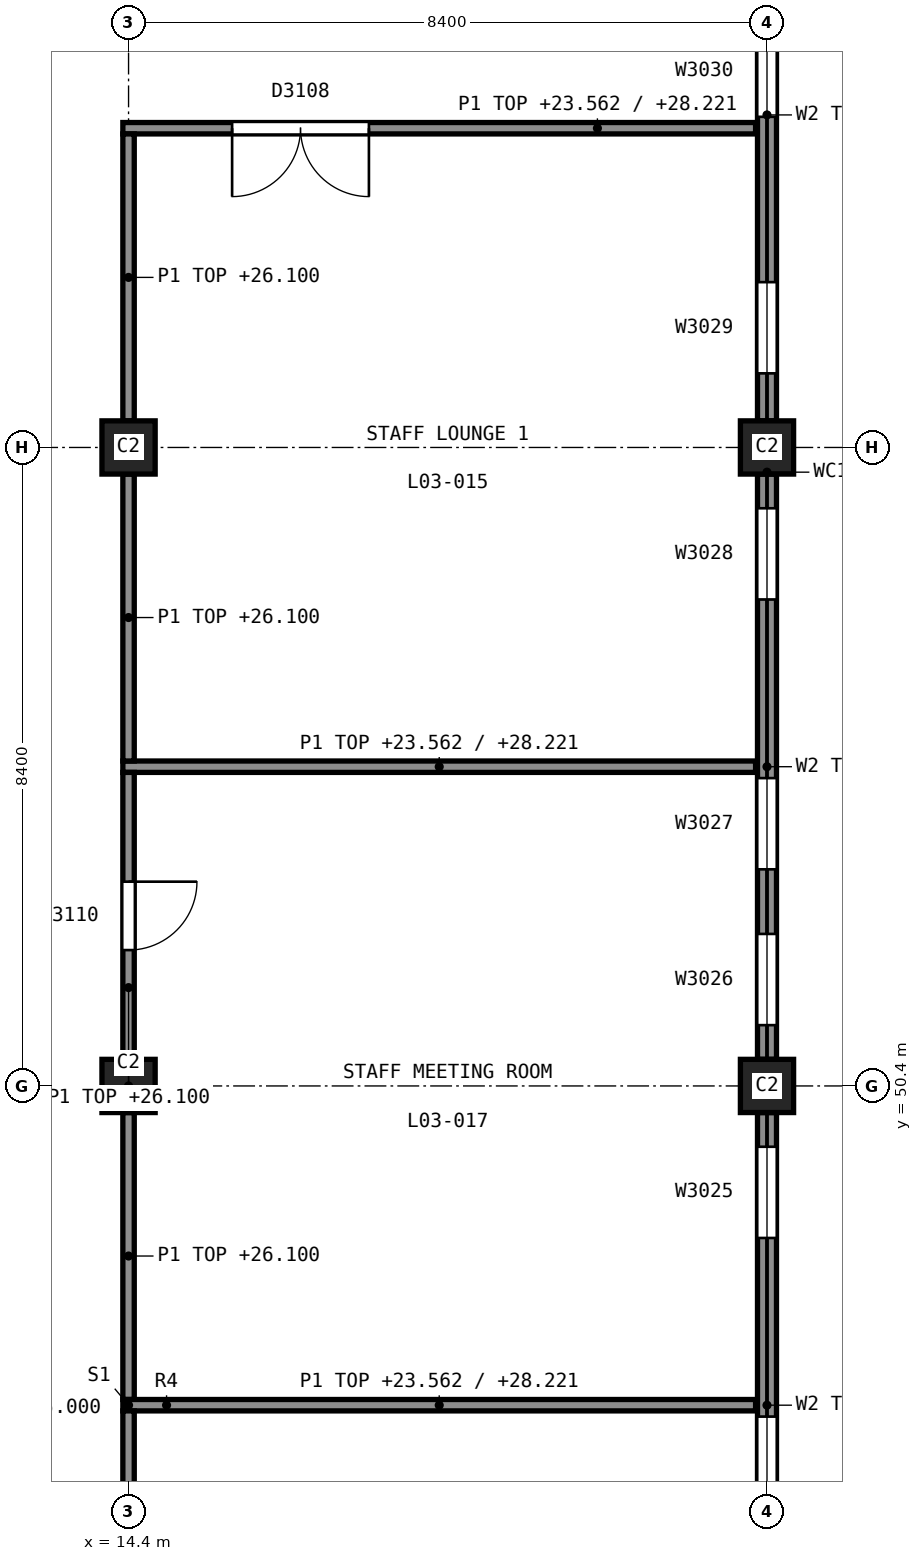
"""IFC4 building model, lengths in metres.
Left out: names, types, materials, properties, quantities, classifications, styles, units other than length and angle.
Written with IfcOpenShell. Run it as: python <this file> out.ifc"""

import sys

from ifc_helpers import new_model, si_unit, direction, frame, frame_2d, origin, origin_2d, place, context, subcontext, project, spatial, polyline, rectangle, outline, extrude, element, fill, save


model = new_model("IFC4")
c1 = context("Model", 3, precision=1e-05, world=origin(), true_north=direction((0.0, 1.0)))
c2 = subcontext(c1, "Body", "Model", "MODEL_VIEW")
j1 = project(units=[si_unit("LENGTHUNIT", "METRE"), si_unit("PLANEANGLEUNIT", "RADIAN")], contexts=[c1])
p1 = place(None, origin())
s1 = spatial("IfcSite", under=j1, at=p1, CompositionType="ELEMENT")
p2 = place(p1, origin())
s2 = spatial("IfcBuilding", under=s1, at=p2, CompositionType="ELEMENT")
p3 = place(p2, frame((0.0, 0.0, 20.0)))
s3 = spatial("IfcBuildingStorey", under=s2, at=p3, CompositionType="ELEMENT", Elevation=20.0)
for number, where, z_axis, x_axis in (
    (1, (14.4, 50.4, 0.0), (0.0, 0.0, 1.0), (1.0, 0.0, 0.0)),
    (2, (14.4, 58.8, 0.0), (0.0, 0.0, 1.0), (1.0, 0.0, 0.0)),
    (3, (22.8, 50.4, 0.0), (0.0, 0.0, 1.0), (1.0, 0.0, 0.0)),
    (4, (22.8, 58.8, 0.0), (0.0, 0.0, 1.0), (1.0, 0.0, 0.0)),
):
    element("IfcColumn", number, at=place(p3, frame(where, z_axis=z_axis, x_axis=x_axis)), inside=s3, PredefinedType="COLUMN", context=c2, shape_type="SweptSolid", body=[
        extrude(rectangle(XDim=0.7, YDim=0.7, at=origin_2d()), origin(), (0.0, 0.0, 1.0), 5.0),
    ])
p4 = place(p3, frame((22.8, 42.35, 0.0), z_axis=(0.0, 0.0, 1.0), x_axis=(0.0, 1.0, 0.0)))
e5 = element("IfcWall", 5, at=p4, inside=s3, PredefinedType="SOLIDWALL", context=c2, shape_type="SweptSolid", body=[
    extrude(rectangle(XDim=7.7, YDim=0.25, at=frame_2d((3.85, 0.0))), origin(), (0.0, 0.0, 1.0), 8.746),
])
p5 = place(p4, frame((0.45, 0.0, 0.9)))
e6 = element("IfcOpeningElement", 6, at=p5, cuts=e5, PredefinedType="OPENING", context=c2, shape_type="SweptSolid", body=[
    extrude(rectangle(XDim=1.2, YDim=2.1, at=frame_2d((0.6, 1.05))), frame((0.0, 0.135, 0.0), z_axis=(0.0, -1.0, 0.0), x_axis=(1.0, 0.0, 0.0)), (0.0, 0.0, 1.0), 0.27),
])
p6 = place(p4, frame((2.5, 0.0, 0.9)))
e7 = element("IfcOpeningElement", 7, at=p6, cuts=e5, PredefinedType="OPENING", context=c2, shape_type="SweptSolid", body=[
    extrude(rectangle(XDim=1.2, YDim=2.1, at=frame_2d((0.6, 1.05))), frame((0.0, 0.135, 0.0), z_axis=(0.0, -1.0, 0.0), x_axis=(1.0, 0.0, 0.0)), (0.0, 0.0, 1.0), 0.27),
])
p7 = place(p4, frame((6.05, 0.0, 0.9)))
e8 = element("IfcOpeningElement", 8, at=p7, cuts=e5, PredefinedType="OPENING", context=c2, shape_type="SweptSolid", body=[
    extrude(rectangle(XDim=1.2, YDim=2.1, at=frame_2d((0.6, 1.05))), frame((0.0, 0.135, 0.0), z_axis=(0.0, -1.0, 0.0), x_axis=(1.0, 0.0, 0.0)), (0.0, 0.0, 1.0), 0.27),
])
p8 = place(p3, frame((22.8, 50.75, 0.0), z_axis=(0.0, 0.0, 1.0), x_axis=(0.0, 1.0, 0.0)))
e9 = element("IfcWall", 9, at=p8, inside=s3, PredefinedType="SOLIDWALL", context=c2, shape_type="SweptSolid", body=[
    extrude(rectangle(XDim=7.7, YDim=0.25, at=frame_2d((3.85, 0.0))), origin(), (0.0, 0.0, 1.0), 8.746),
])
p9 = place(p8, frame((0.45, 0.0, 0.9)))
e10 = element("IfcOpeningElement", 10, at=p9, cuts=e9, PredefinedType="OPENING", context=c2, shape_type="SweptSolid", body=[
    extrude(rectangle(XDim=1.2, YDim=2.1, at=frame_2d((0.6, 1.05))), frame((0.0, 0.135, 0.0), z_axis=(0.0, -1.0, 0.0), x_axis=(1.0, 0.0, 0.0)), (0.0, 0.0, 1.0), 0.27),
])
p10 = place(p8, frame((2.5, 0.0, 0.9)))
e11 = element("IfcOpeningElement", 11, at=p10, cuts=e9, PredefinedType="OPENING", context=c2, shape_type="SweptSolid", body=[
    extrude(rectangle(XDim=1.2, YDim=2.1, at=frame_2d((0.6, 1.05))), frame((0.0, 0.135, 0.0), z_axis=(0.0, -1.0, 0.0), x_axis=(1.0, 0.0, 0.0)), (0.0, 0.0, 1.0), 0.27),
])
p11 = place(p8, frame((6.05, 0.0, 0.9)))
e12 = element("IfcOpeningElement", 12, at=p11, cuts=e9, PredefinedType="OPENING", context=c2, shape_type="SweptSolid", body=[
    extrude(rectangle(XDim=1.2, YDim=2.1, at=frame_2d((0.6, 1.05))), frame((0.0, 0.135, 0.0), z_axis=(0.0, -1.0, 0.0), x_axis=(1.0, 0.0, 0.0)), (0.0, 0.0, 1.0), 0.27),
])
p12 = place(p3, frame((22.8, 59.15, 0.0), z_axis=(0.0, 0.0, 1.0), x_axis=(0.0, 1.0, 0.0)))
e13 = element("IfcWall", 13, at=p12, inside=s3, PredefinedType="SOLIDWALL", context=c2, shape_type="SweptSolid", body=[
    extrude(rectangle(XDim=8.05, YDim=0.25, at=frame_2d((4.025, 0.0))), origin(), (0.0, 0.0, 1.0), 8.746),
])
p13 = place(p12, frame((0.625, 0.0, 0.9)))
e14 = element("IfcOpeningElement", 14, at=p13, cuts=e13, PredefinedType="OPENING", context=c2, shape_type="SweptSolid", body=[
    extrude(rectangle(XDim=1.2, YDim=2.1, at=frame_2d((0.6, 1.05))), frame((0.0, 0.135, 0.0), z_axis=(0.0, -1.0, 0.0), x_axis=(1.0, 0.0, 0.0)), (0.0, 0.0, 1.0), 0.27),
])
p14 = place(p12, frame((4.0, 0.0, 0.9)))
e15 = element("IfcOpeningElement", 15, at=p14, cuts=e13, PredefinedType="OPENING", context=c2, shape_type="SweptSolid", body=[
    extrude(rectangle(XDim=1.2, YDim=2.1, at=frame_2d((0.6, 1.05))), frame((0.0, 0.135, 0.0), z_axis=(0.0, -1.0, 0.0), x_axis=(1.0, 0.0, 0.0)), (0.0, 0.0, 1.0), 0.27),
])
p15 = place(p12, frame((6.225, 0.0, 0.9)))
e16 = element("IfcOpeningElement", 16, at=p15, cuts=e13, PredefinedType="OPENING", context=c2, shape_type="SweptSolid", body=[
    extrude(rectangle(XDim=1.2, YDim=2.1, at=frame_2d((0.6, 1.05))), frame((0.0, 0.135, 0.0), z_axis=(0.0, -1.0, 0.0), x_axis=(1.0, 0.0, 0.0)), (0.0, 0.0, 1.0), 0.27),
])
p16 = place(p3, frame((14.325, 54.6, 0.0), z_axis=(0.0, 0.0, 1.0), x_axis=(1.0, 0.0, 0.0)))
e17 = element("IfcWall", 17, at=p16, inside=s3, PredefinedType="PARTITIONING", context=c2, shape_type="SweptSolid", body=[
    extrude(outline(polyline([(0.0, 0.0), (8.325, 0.0), (8.325, 8.221), (7.35, 8.005), (1.05, 6.355), (0.0, 3.562), (0.0, 0.0)])), frame((0.0, 0.075, 0.0), z_axis=(0.0, -1.0, 0.0), x_axis=(1.0, 0.0, 0.0)), (0.0, 0.0, 1.0), 0.15),
])
p17 = place(p3, frame((14.325, 63.0, 0.0), z_axis=(0.0, 0.0, 1.0), x_axis=(1.0, 0.0, 0.0)))
e18 = element("IfcWall", 18, at=p17, inside=s3, PredefinedType="PARTITIONING", context=c2, shape_type="SweptSolid", body=[
    extrude(outline(polyline([(0.0, 0.0), (8.325, 0.0), (8.325, 8.221), (7.35, 8.005), (1.05, 6.355), (0.0, 3.562), (0.0, 0.0)])), frame((0.0, 0.075, 0.0), z_axis=(0.0, -1.0, 0.0), x_axis=(1.0, 0.0, 0.0)), (0.0, 0.0, 1.0), 0.15),
])
p18 = place(p17, frame((1.438, 0.0, 0.0)))
e19 = element("IfcOpeningElement", 19, at=p18, cuts=e18, PredefinedType="OPENING", context=c2, shape_type="SweptSolid", body=[
    extrude(rectangle(XDim=1.8, YDim=2.1, at=frame_2d((0.9, 1.05))), frame((0.0, 0.085, 0.0), z_axis=(0.0, -1.0, 0.0), x_axis=(1.0, 0.0, 0.0)), (0.0, 0.0, 1.0), 0.17),
])
p19 = place(p3, frame((14.4, 54.675, 0.0), z_axis=(0.0, 0.0, 1.0), x_axis=(0.0, 1.0, 0.0)))
e20 = element("IfcWall", 20, at=p19, inside=s3, PredefinedType="PARTITIONING", context=c2, shape_type="SweptSolid", body=[
    extrude(rectangle(XDim=3.775, YDim=0.15, at=frame_2d((1.887, 0.0))), origin(), (0.0, 0.0, 1.0), 6.1),
])
p20 = place(p3, frame((14.4, 59.15, 0.0), z_axis=(0.0, 0.0, 1.0), x_axis=(0.0, 1.0, 0.0)))
e21 = element("IfcWall", 21, at=p20, inside=s3, PredefinedType="PARTITIONING", context=c2, shape_type="SweptSolid", body=[
    extrude(outline(polyline([(0.0, 0.0), (3.775, 0.0), (3.775, 6.1), (2.1, 6.1), (1.05, 3.562), (0.0, 6.1), (0.0, 0.0)])), frame((0.0, 0.075, 0.0), z_axis=(0.0, -1.0, 0.0), x_axis=(1.0, 0.0, 0.0)), (0.0, 0.0, 1.0), 0.15),
])
p21 = place(p3, frame((14.4, 46.275, 0.0), z_axis=(0.0, 0.0, 1.0), x_axis=(0.0, 1.0, 0.0)))
e22 = element("IfcWall", 22, at=p21, inside=s3, PredefinedType="PARTITIONING", context=c2, shape_type="SweptSolid", body=[
    extrude(rectangle(XDim=3.775, YDim=0.15, at=frame_2d((1.888, 0.0))), origin(), (0.0, 0.0, 1.0), 6.1),
])
p22 = place(p3, frame((14.4, 50.75, 0.0), z_axis=(0.0, 0.0, 1.0), x_axis=(0.0, 1.0, 0.0)))
e23 = element("IfcWall", 23, at=p22, inside=s3, PredefinedType="PARTITIONING", context=c2, shape_type="SweptSolid", body=[
    extrude(outline(polyline([(0.0, 0.0), (3.775, 0.0), (3.775, 6.1), (2.1, 6.1), (1.05, 3.562), (0.0, 6.1), (0.0, 0.0)])), frame((0.0, 0.075, 0.0), z_axis=(0.0, -1.0, 0.0), x_axis=(1.0, 0.0, 0.0)), (0.0, 0.0, 1.0), 0.15),
])
p23 = place(p22, frame((1.438, 0.0, 0.0)))
e24 = element("IfcOpeningElement", 24, at=p23, cuts=e23, PredefinedType="OPENING", context=c2, shape_type="SweptSolid", body=[
    extrude(rectangle(XDim=0.9, YDim=2.1, at=frame_2d((0.45, 1.05))), frame((0.0, 0.085, 0.0), z_axis=(0.0, -1.0, 0.0), x_axis=(1.0, 0.0, 0.0)), (0.0, 0.0, 1.0), 0.17),
])
p24 = place(p3, frame((14.325, 46.2, 0.0), z_axis=(0.0, 0.0, 1.0), x_axis=(1.0, 0.0, 0.0)))
e25 = element("IfcWall", 25, at=p24, inside=s3, PredefinedType="PARTITIONING", context=c2, shape_type="SweptSolid", body=[
    extrude(outline(polyline([(0.0, 0.0), (8.325, 0.0), (8.325, 8.221), (7.35, 8.005), (1.05, 6.355), (0.0, 3.562), (0.0, 0.0)])), frame((0.0, 0.075, 0.0), z_axis=(0.0, -1.0, 0.0), x_axis=(1.0, 0.0, 0.0)), (0.0, 0.0, 1.0), 0.15),
])
p25 = place(p3, frame((14.4, 42.35, 0.0), z_axis=(0.0, 0.0, 1.0), x_axis=(0.0, 1.0, 0.0)))
e26 = element("IfcWall", 26, at=p25, inside=s3, PredefinedType="PARTITIONING", context=c2, shape_type="SweptSolid", body=[
    extrude(outline(polyline([(0.0, 0.0), (3.775, 0.0), (3.775, 6.1), (2.1, 6.1), (1.05, 3.562), (0.0, 6.1), (0.0, 0.0)])), frame((0.0, 0.075, 0.0), z_axis=(0.0, -1.0, 0.0), x_axis=(1.0, 0.0, 0.0)), (0.0, 0.0, 1.0), 0.15),
])
p26 = place(p6, origin())
e27 = element("IfcWindow", 27, at=p26, inside=s3, PartitioningType="SINGLE_PANEL", PredefinedType="WINDOW", context=c2, shape_type="SweptSolid", body=[
    extrude(rectangle(XDim=1.2, YDim=2.1, at=frame_2d((0.6, 1.05))), frame((0.0, 0.105, 0.0), z_axis=(0.0, -1.0, 0.0), x_axis=(1.0, 0.0, 0.0)), (0.0, 0.0, 1.0), 0.06),
])
fill(e7, e27)
p27 = place(p7, origin())
e28 = element("IfcWindow", 28, at=p27, inside=s3, PartitioningType="SINGLE_PANEL", PredefinedType="WINDOW", context=c2, shape_type="SweptSolid", body=[
    extrude(rectangle(XDim=1.2, YDim=2.1, at=frame_2d((0.6, 1.05))), frame((0.0, 0.105, 0.0), z_axis=(0.0, -1.0, 0.0), x_axis=(1.0, 0.0, 0.0)), (0.0, 0.0, 1.0), 0.06),
])
fill(e8, e28)
p28 = place(p9, origin())
e29 = element("IfcWindow", 29, at=p28, inside=s3, PartitioningType="SINGLE_PANEL", PredefinedType="WINDOW", context=c2, shape_type="SweptSolid", body=[
    extrude(rectangle(XDim=1.2, YDim=2.1, at=frame_2d((0.6, 1.05))), frame((0.0, 0.105, 0.0), z_axis=(0.0, -1.0, 0.0), x_axis=(1.0, 0.0, 0.0)), (0.0, 0.0, 1.0), 0.06),
])
fill(e10, e29)
p29 = place(p10, origin())
e30 = element("IfcWindow", 30, at=p29, inside=s3, PartitioningType="SINGLE_PANEL", PredefinedType="WINDOW", context=c2, shape_type="SweptSolid", body=[
    extrude(rectangle(XDim=1.2, YDim=2.1, at=frame_2d((0.6, 1.05))), frame((0.0, 0.105, 0.0), z_axis=(0.0, -1.0, 0.0), x_axis=(1.0, 0.0, 0.0)), (0.0, 0.0, 1.0), 0.06),
])
fill(e11, e30)
p30 = place(p11, origin())
e31 = element("IfcWindow", 31, at=p30, inside=s3, PartitioningType="SINGLE_PANEL", PredefinedType="WINDOW", context=c2, shape_type="SweptSolid", body=[
    extrude(rectangle(XDim=1.2, YDim=2.1, at=frame_2d((0.6, 1.05))), frame((0.0, 0.105, 0.0), z_axis=(0.0, -1.0, 0.0), x_axis=(1.0, 0.0, 0.0)), (0.0, 0.0, 1.0), 0.06),
])
fill(e12, e31)
p31 = place(p13, origin())
e32 = element("IfcWindow", 32, at=p31, inside=s3, PartitioningType="SINGLE_PANEL", PredefinedType="WINDOW", context=c2, shape_type="SweptSolid", body=[
    extrude(rectangle(XDim=1.2, YDim=2.1, at=frame_2d((0.6, 1.05))), frame((0.0, 0.105, 0.0), z_axis=(0.0, -1.0, 0.0), x_axis=(1.0, 0.0, 0.0)), (0.0, 0.0, 1.0), 0.06),
])
fill(e14, e32)
p32 = place(p14, origin())
e33 = element("IfcWindow", 33, at=p32, inside=s3, PartitioningType="SINGLE_PANEL", PredefinedType="WINDOW", context=c2, shape_type="SweptSolid", body=[
    extrude(rectangle(XDim=1.2, YDim=2.1, at=frame_2d((0.6, 1.05))), frame((0.0, 0.105, 0.0), z_axis=(0.0, -1.0, 0.0), x_axis=(1.0, 0.0, 0.0)), (0.0, 0.0, 1.0), 0.06),
])
fill(e15, e33)
p33 = place(p18, origin())
e34 = element("IfcDoor", 34, at=p33, inside=s3, OperationType="DOUBLE_DOOR_SINGLE_SWING", PredefinedType="DOOR", context=c2, shape_type="SweptSolid", body=[
    extrude(rectangle(XDim=1.8, YDim=2.1, at=frame_2d((0.9, 1.05))), frame((0.0, 0.025, 0.0), z_axis=(0.0, -1.0, 0.0), x_axis=(1.0, 0.0, 0.0)), (0.0, 0.0, 1.0), 0.05),
])
fill(e19, e34)
p34 = place(p23, origin())
e35 = element("IfcDoor", 35, at=p34, inside=s3, OperationType="SINGLE_SWING_RIGHT", PredefinedType="DOOR", context=c2, shape_type="SweptSolid", body=[
    extrude(rectangle(XDim=0.9, YDim=2.1, at=frame_2d((0.45, 1.05))), frame((0.0, 0.025, 0.0), z_axis=(0.0, -1.0, 0.0), x_axis=(1.0, 0.0, 0.0)), (0.0, 0.0, 1.0), 0.05),
])
fill(e24, e35)
save(model, sys.argv[1])
